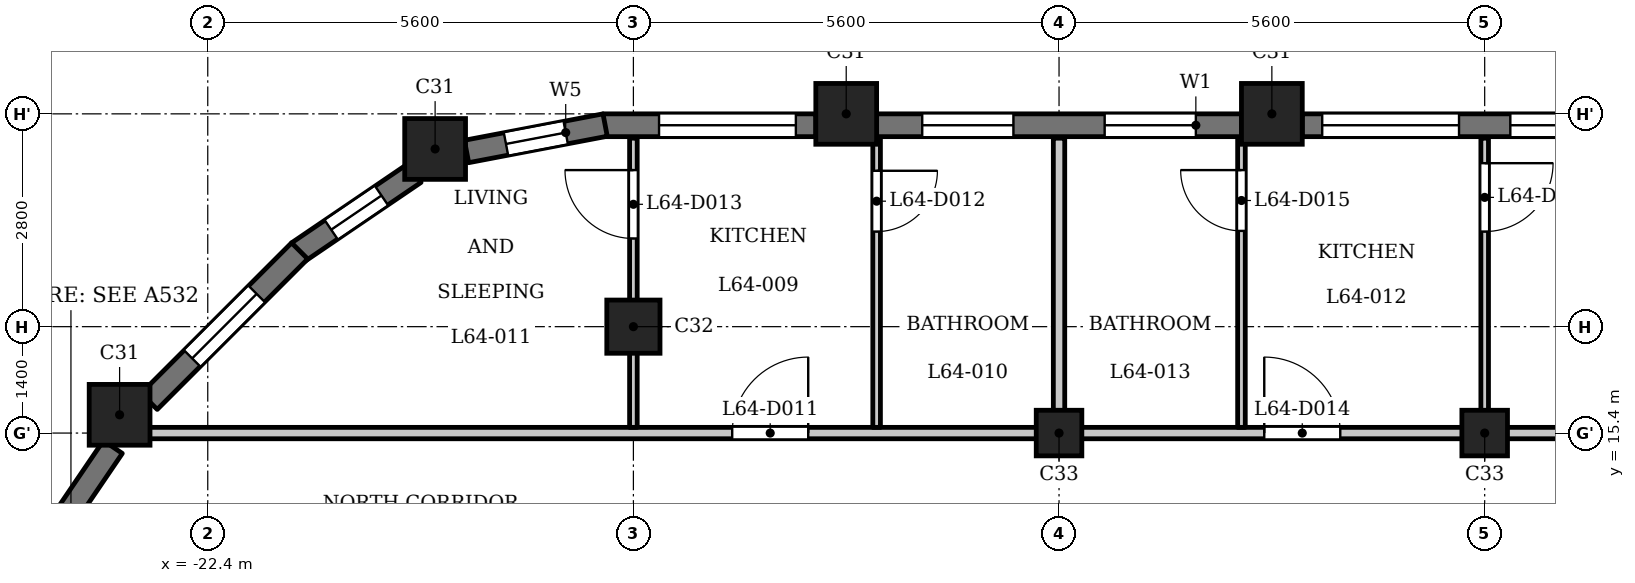
"""IFC4 building model, lengths in metres.
Left out: names, types, materials, properties, quantities, classifications, styles, units other than length and angle.
Written with IfcOpenShell. Run it as: python <this file> out.ifc"""

import sys

from ifc_helpers import new_model, si_unit, direction, frame, frame_2d, origin, origin_2d, place, context, subcontext, project, spatial, rectangle, extrude, element, fill, save


model = new_model("IFC4")
c1 = context("Model", 3, precision=1e-05, world=origin(), true_north=direction((0.0, 1.0)))
c2 = subcontext(c1, "Body", "Model", "MODEL_VIEW")
j1 = project(units=[si_unit("LENGTHUNIT", "METRE"), si_unit("PLANEANGLEUNIT", "RADIAN")], contexts=[c1])
p1 = place(None, origin())
s1 = spatial("IfcSite", under=j1, at=p1, CompositionType="ELEMENT")
p2 = place(p1, origin())
s2 = spatial("IfcBuilding", under=s1, at=p2, CompositionType="ELEMENT")
p3 = place(p2, frame((0.0, 0.0, 248.7)))
s3 = spatial("IfcBuildingStorey", under=s2, at=p3, CompositionType="ELEMENT", Elevation=248.7)
for number, where, z_axis, x_axis in (
    (1, (-8.4, 19.6, 0.0), (0.0, 0.0, 1.0), (1.0, 0.0, 0.0)),
    (2, (-14.0, 19.6, 0.0), (0.0, 0.0, 1.0), (1.0, 0.0, 0.0)),
    (3, (-19.409, 19.138, 0.0), (0.0, 0.0, 1.0), (1.0, 0.0, 0.0)),
    (4, (-23.56, 15.64, 0.0), (0.0, 0.0, 1.0), (1.0, 0.0, 0.0)),
):
    element("IfcColumn", number, at=place(p3, frame(where, z_axis=z_axis, x_axis=x_axis)), inside=s3, PredefinedType="COLUMN", context=c2, shape_type="SweptSolid", body=[
        extrude(rectangle(XDim=0.8, YDim=0.8, at=origin_2d()), origin(), (0.0, 0.0, 1.0), 3.5),
    ])
p4 = place(p3, frame((-16.8, 16.8, 0.0), z_axis=(0.0, 0.0, 1.0), x_axis=(1.0, 0.0, 0.0)))
e5 = element("IfcColumn", 5, at=p4, inside=s3, PredefinedType="COLUMN", context=c2, shape_type="SweptSolid", body=[
    extrude(rectangle(XDim=0.7, YDim=0.7, at=origin_2d()), origin(), (0.0, 0.0, 1.0), 3.5),
])
for number, where, z_axis, x_axis in (
    (6, (-11.2, 15.4, 0.0), (0.0, 0.0, 1.0), (1.0, 0.0, 0.0)),
    (7, (-5.6, 15.4, 0.0), (0.0, 0.0, 1.0), (1.0, 0.0, 0.0)),
):
    element("IfcColumn", number, at=place(p3, frame(where, z_axis=z_axis, x_axis=x_axis)), inside=s3, PredefinedType="COLUMN", context=c2, shape_type="SweptSolid", body=[
        extrude(rectangle(XDim=0.6, YDim=0.6, at=origin_2d()), origin(), (0.0, 0.0, 1.0), 3.5),
    ])
p5 = place(p3, frame((-3.2, 19.45, 0.0), z_axis=(0.0, 0.0, 1.0), x_axis=(-1.0, 0.0, 0.0)))
e8 = element("IfcWall", 8, at=p5, inside=s3, PredefinedType="SOLIDWALL", context=c2, shape_type="SweptSolid", body=[
    extrude(rectangle(XDim=4.8, YDim=0.3, at=frame_2d((2.4, 0.0))), origin(), (0.0, 0.0, 1.0), 2.55),
])
p6 = place(p5, frame((0.262, 0.0, 0.9)))
e9 = element("IfcOpeningElement", 9, at=p6, cuts=e8, PredefinedType="OPENING", context=c2, shape_type="SweptSolid", body=[
    extrude(rectangle(XDim=1.8, YDim=1.25, at=frame_2d((0.9, 0.625))), frame((0.0, 0.16, 0.0), z_axis=(0.0, -1.0, 0.0), x_axis=(1.0, 0.0, 0.0)), (0.0, 0.0, 1.0), 0.32),
])
p7 = place(p5, frame((2.738, 0.0, 0.9)))
e10 = element("IfcOpeningElement", 10, at=p7, cuts=e8, PredefinedType="OPENING", context=c2, shape_type="SweptSolid", body=[
    extrude(rectangle(XDim=1.8, YDim=1.25, at=frame_2d((0.9, 0.625))), frame((0.0, 0.16, 0.0), z_axis=(0.0, -1.0, 0.0), x_axis=(1.0, 0.0, 0.0)), (0.0, 0.0, 1.0), 0.32),
])
p8 = place(p3, frame((-8.8, 19.45, 0.0), z_axis=(0.0, 0.0, 1.0), x_axis=(-1.0, 0.0, 0.0)))
e11 = element("IfcWall", 11, at=p8, inside=s3, PredefinedType="SOLIDWALL", context=c2, shape_type="SweptSolid", body=[
    extrude(rectangle(XDim=4.8, YDim=0.3, at=frame_2d((2.4, 0.0))), origin(), (0.0, 0.0, 1.0), 2.55),
])
p9 = place(p8, frame((0.6, 0.0, 0.6)))
e12 = element("IfcOpeningElement", 12, at=p9, cuts=e11, PredefinedType="OPENING", context=c2, shape_type="SweptSolid", body=[
    extrude(rectangle(XDim=1.2, YDim=1.55, at=frame_2d((0.6, 0.775))), frame((0.0, 0.16, 0.0), z_axis=(0.0, -1.0, 0.0), x_axis=(1.0, 0.0, 0.0)), (0.0, 0.0, 1.0), 0.32),
])
p10 = place(p8, frame((3.0, 0.0, 0.6)))
e13 = element("IfcOpeningElement", 13, at=p10, cuts=e11, PredefinedType="OPENING", context=c2, shape_type="SweptSolid", body=[
    extrude(rectangle(XDim=1.2, YDim=1.55, at=frame_2d((0.6, 0.775))), frame((0.0, 0.16, 0.0), z_axis=(0.0, -1.0, 0.0), x_axis=(1.0, 0.0, 0.0)), (0.0, 0.0, 1.0), 0.32),
])
p11 = place(p3, frame((-14.4, 19.45, 0.0), z_axis=(0.0, 0.0, 1.0), x_axis=(-1.0, 0.0, 0.0)))
e14 = element("IfcWall", 14, at=p11, inside=s3, PredefinedType="SOLIDWALL", context=c2, shape_type="SweptSolid", body=[
    extrude(rectangle(XDim=2.8, YDim=0.3, at=frame_2d((1.4, 0.0))), origin(), (0.0, 0.0, 1.0), 2.55),
])
p12 = place(p11, frame((0.262, 0.0, 0.9)))
e15 = element("IfcOpeningElement", 15, at=p12, cuts=e14, PredefinedType="OPENING", context=c2, shape_type="SweptSolid", body=[
    extrude(rectangle(XDim=1.8, YDim=1.25, at=frame_2d((0.9, 0.625))), frame((0.0, 0.16, 0.0), z_axis=(0.0, -1.0, 0.0), x_axis=(1.0, 0.0, 0.0)), (0.0, 0.0, 1.0), 0.32),
])
p13 = place(p3, frame((-17.172, 19.453, 0.0), z_axis=(0.0, 0.0, 1.0), x_axis=(-0.982301706131, -0.187305520826, 0.0)))
e16 = element("IfcWall", 16, at=p13, inside=s3, PredefinedType="SOLIDWALL", context=c2, shape_type="SweptSolid", body=[
    extrude(rectangle(XDim=1.856, YDim=0.3, at=frame_2d((0.928, 0.0))), origin(), (0.0, 0.0, 1.0), 2.55),
])
p14 = place(p13, frame((0.528, 0.0, 0.6)))
e17 = element("IfcOpeningElement", 17, at=p14, cuts=e16, PredefinedType="OPENING", context=c2, shape_type="SweptSolid", body=[
    extrude(rectangle(XDim=0.8, YDim=1.55, at=frame_2d((0.4, 0.775))), frame((0.0, 0.16, 0.0), z_axis=(0.0, -1.0, 0.0), x_axis=(1.0, 0.0, 0.0)), (0.0, 0.0, 1.0), 0.32),
])
p15 = place(p3, frame((-19.678, 18.822, 0.0), z_axis=(0.0, 0.0, 1.0), x_axis=(-0.826997446962, -0.562205676526, 0.0)))
e18 = element("IfcWall", 18, at=p15, inside=s3, PredefinedType="SOLIDWALL", context=c2, shape_type="SweptSolid", body=[
    extrude(rectangle(XDim=1.856, YDim=0.3, at=frame_2d((0.928, 0.0))), origin(), (0.0, 0.0, 1.0), 2.55),
])
p16 = place(p15, frame((0.528, 0.0, 0.6)))
e19 = element("IfcOpeningElement", 19, at=p16, cuts=e18, PredefinedType="OPENING", context=c2, shape_type="SweptSolid", body=[
    extrude(rectangle(XDim=0.8, YDim=1.55, at=frame_2d((0.4, 0.775))), frame((0.0, 0.16, 0.0), z_axis=(0.0, -1.0, 0.0), x_axis=(1.0, 0.0, 0.0)), (0.0, 0.0, 1.0), 0.32),
])
p17 = place(p3, frame((-21.191, 17.797, 0.0), z_axis=(0.0, 0.0, 1.0), x_axis=(-0.707106781187, -0.707106781187, 0.0)))
e20 = element("IfcWall", 20, at=p17, inside=s3, PredefinedType="SOLIDWALL", context=c2, shape_type="SweptSolid", body=[
    extrude(rectangle(XDim=2.8, YDim=0.3, at=frame_2d((1.4, 0.0))), origin(), (0.0, 0.0, 1.0), 2.55),
])
p18 = place(p17, frame((0.8, 0.0, 0.6)))
e21 = element("IfcOpeningElement", 21, at=p18, cuts=e20, PredefinedType="OPENING", context=c2, shape_type="SweptSolid", body=[
    extrude(rectangle(XDim=1.2, YDim=1.55, at=frame_2d((0.6, 0.775))), frame((0.0, 0.16, 0.0), z_axis=(0.0, -1.0, 0.0), x_axis=(1.0, 0.0, 0.0)), (0.0, 0.0, 1.0), 0.32),
])
p19 = place(p3, frame((-23.648, 15.217, 0.0), z_axis=(0.0, 0.0, 1.0), x_axis=(-0.562043265151, -0.827107833416, 0.0)))
e22 = element("IfcWall", 22, at=p19, inside=s3, PredefinedType="SOLIDWALL", context=c2, shape_type="SweptSolid", body=[
    extrude(rectangle(XDim=1.377, YDim=0.3, at=frame_2d((0.688, 0.0))), origin(), (0.0, 0.0, 1.0), 2.55),
])
p20 = place(p3, frame((-23.55, 15.4, 0.0), z_axis=(0.0, 0.0, 1.0), x_axis=(1.0, 0.0, 0.0)))
e23 = element("IfcWall", 23, at=p20, inside=s3, PredefinedType="PARTITIONING", context=c2, shape_type="SweptSolid", body=[
    extrude(rectangle(XDim=46.872, YDim=0.15, at=frame_2d((23.436, 0.0))), origin(), (0.0, 0.0, 1.0), 3.2),
])
p21 = place(p20, frame((8.05, 0.0, 0.0)))
e24 = element("IfcOpeningElement", 24, at=p21, cuts=e23, PredefinedType="OPENING", context=c2, shape_type="SweptSolid", body=[
    extrude(rectangle(XDim=1.0, YDim=2.1, at=frame_2d((0.5, 1.05))), frame((0.0, 0.085, 0.0), z_axis=(0.0, -1.0, 0.0), x_axis=(1.0, 0.0, 0.0)), (0.0, 0.0, 1.0), 0.17),
])
p22 = place(p20, frame((15.05, 0.0, 0.0)))
e25 = element("IfcOpeningElement", 25, at=p22, cuts=e23, PredefinedType="OPENING", context=c2, shape_type="SweptSolid", body=[
    extrude(rectangle(XDim=1.0, YDim=2.1, at=frame_2d((0.5, 1.05))), frame((0.0, 0.085, 0.0), z_axis=(0.0, -1.0, 0.0), x_axis=(1.0, 0.0, 0.0)), (0.0, 0.0, 1.0), 0.17),
])
p23 = place(p20, frame((30.95, 0.0, 0.0)))
e26 = element("IfcOpeningElement", 26, at=p23, cuts=e23, PredefinedType="OPENING", context=c2, shape_type="SweptSolid", body=[
    extrude(rectangle(XDim=1.0, YDim=2.1, at=frame_2d((0.5, 1.05))), frame((0.0, 0.085, 0.0), z_axis=(0.0, -1.0, 0.0), x_axis=(1.0, 0.0, 0.0)), (0.0, 0.0, 1.0), 0.17),
])
p24 = place(p20, frame((38.2, 0.0, 0.0)))
e27 = element("IfcOpeningElement", 27, at=p24, cuts=e23, PredefinedType="OPENING", context=c2, shape_type="SweptSolid", body=[
    extrude(rectangle(XDim=1.0, YDim=2.1, at=frame_2d((0.5, 1.05))), frame((0.0, 0.085, 0.0), z_axis=(0.0, -1.0, 0.0), x_axis=(1.0, 0.0, 0.0)), (0.0, 0.0, 1.0), 0.17),
])
p25 = place(p3, frame((-16.8, 15.475, 0.0), z_axis=(0.0, 0.0, 1.0), x_axis=(0.0, 1.0, 0.0)))
e28 = element("IfcWall", 28, at=p25, inside=s3, PredefinedType="PARTITIONING", context=c2, shape_type="SweptSolid", body=[
    extrude(rectangle(XDim=3.805, YDim=0.1, at=frame_2d((1.902, 0.0))), origin(), (0.0, 0.0, 1.0), 3.2),
])
p26 = place(p25, frame((2.485, 0.0, 0.0)))
e29 = element("IfcOpeningElement", 29, at=p26, cuts=e28, PredefinedType="OPENING", context=c2, shape_type="SweptSolid", body=[
    extrude(rectangle(XDim=0.9, YDim=2.1, at=frame_2d((0.45, 1.05))), frame((0.0, 0.06, 0.0), z_axis=(0.0, -1.0, 0.0), x_axis=(1.0, 0.0, 0.0)), (0.0, 0.0, 1.0), 0.12),
])
p27 = place(p3, frame((-13.6, 15.475, 0.0), z_axis=(0.0, 0.0, 1.0), x_axis=(0.0, 1.0, 0.0)))
e30 = element("IfcWall", 30, at=p27, inside=s3, PredefinedType="PARTITIONING", context=c2, shape_type="SweptSolid", body=[
    extrude(rectangle(XDim=3.805, YDim=0.1, at=frame_2d((1.902, 0.0))), origin(), (0.0, 0.0, 1.0), 3.2),
])
p28 = place(p27, frame((2.576, 0.0, 0.0)))
e31 = element("IfcOpeningElement", 31, at=p28, cuts=e30, PredefinedType="OPENING", context=c2, shape_type="SweptSolid", body=[
    extrude(rectangle(XDim=0.8, YDim=2.1, at=frame_2d((0.4, 1.05))), frame((0.0, 0.06, 0.0), z_axis=(0.0, -1.0, 0.0), x_axis=(1.0, 0.0, 0.0)), (0.0, 0.0, 1.0), 0.12),
])
p29 = place(p3, frame((-11.2, 15.475, 0.0), z_axis=(0.0, 0.0, 1.0), x_axis=(0.0, 1.0, 0.0)))
e32 = element("IfcWall", 32, at=p29, inside=s3, PredefinedType="PARTITIONING", context=c2, shape_type="SweptSolid", body=[
    extrude(rectangle(XDim=3.805, YDim=0.15, at=frame_2d((1.902, 0.0))), origin(), (0.0, 0.0, 1.0), 3.2),
])
p30 = place(p3, frame((-8.8, 15.475, 0.0), z_axis=(0.0, 0.0, 1.0), x_axis=(0.0, 1.0, 0.0)))
e33 = element("IfcWall", 33, at=p30, inside=s3, PredefinedType="PARTITIONING", context=c2, shape_type="SweptSolid", body=[
    extrude(rectangle(XDim=3.805, YDim=0.1, at=frame_2d((1.902, 0.0))), origin(), (0.0, 0.0, 1.0), 3.2),
])
p31 = place(p30, frame((2.585, 0.0, 0.0)))
e34 = element("IfcOpeningElement", 34, at=p31, cuts=e33, PredefinedType="OPENING", context=c2, shape_type="SweptSolid", body=[
    extrude(rectangle(XDim=0.8, YDim=2.1, at=frame_2d((0.4, 1.05))), frame((0.0, 0.06, 0.0), z_axis=(0.0, -1.0, 0.0), x_axis=(1.0, 0.0, 0.0)), (0.0, 0.0, 1.0), 0.12),
])
p32 = place(p3, frame((-5.6, 15.475, 0.0), z_axis=(0.0, 0.0, 1.0), x_axis=(0.0, 1.0, 0.0)))
e35 = element("IfcWall", 35, at=p32, inside=s3, PredefinedType="PARTITIONING", context=c2, shape_type="SweptSolid", body=[
    extrude(rectangle(XDim=3.805, YDim=0.1, at=frame_2d((1.902, 0.0))), origin(), (0.0, 0.0, 1.0), 3.2),
])
p33 = place(p32, frame((2.576, 0.0, 0.0)))
e36 = element("IfcOpeningElement", 36, at=p33, cuts=e35, PredefinedType="OPENING", context=c2, shape_type="SweptSolid", body=[
    extrude(rectangle(XDim=0.9, YDim=2.1, at=frame_2d((0.45, 1.05))), frame((0.0, 0.06, 0.0), z_axis=(0.0, -1.0, 0.0), x_axis=(1.0, 0.0, 0.0)), (0.0, 0.0, 1.0), 0.12),
])
p34 = place(p21, origin())
e37 = element("IfcDoor", 37, at=p34, inside=s3, OperationType="SINGLE_SWING_LEFT", PredefinedType="DOOR", context=c2, shape_type="SweptSolid", body=[
    extrude(rectangle(XDim=1.0, YDim=2.1, at=frame_2d((0.5, 1.05))), frame((0.0, 0.025, 0.0), z_axis=(0.0, -1.0, 0.0), x_axis=(1.0, 0.0, 0.0)), (0.0, 0.0, 1.0), 0.05),
])
fill(e24, e37)
p35 = place(p28, origin())
e38 = element("IfcDoor", 38, at=p35, inside=s3, OperationType="SINGLE_SWING_RIGHT", PredefinedType="DOOR", context=c2, shape_type="SweptSolid", body=[
    extrude(rectangle(XDim=0.8, YDim=2.1, at=frame_2d((0.4, 1.05))), frame((0.0, 0.025, 0.0), z_axis=(0.0, -1.0, 0.0), x_axis=(1.0, 0.0, 0.0)), (0.0, 0.0, 1.0), 0.05),
])
fill(e31, e38)
p36 = place(p26, origin())
e39 = element("IfcDoor", 39, at=p36, inside=s3, OperationType="SINGLE_SWING_LEFT", PredefinedType="DOOR", context=c2, shape_type="SweptSolid", body=[
    extrude(rectangle(XDim=0.9, YDim=2.1, at=frame_2d((0.45, 1.05))), frame((0.0, 0.025, 0.0), z_axis=(0.0, -1.0, 0.0), x_axis=(1.0, 0.0, 0.0)), (0.0, 0.0, 1.0), 0.05),
])
fill(e29, e39)
p37 = place(p22, origin())
e40 = element("IfcDoor", 40, at=p37, inside=s3, OperationType="SINGLE_SWING_RIGHT", PredefinedType="DOOR", context=c2, shape_type="SweptSolid", body=[
    extrude(rectangle(XDim=1.0, YDim=2.1, at=frame_2d((0.5, 1.05))), frame((0.0, 0.025, 0.0), z_axis=(0.0, -1.0, 0.0), x_axis=(1.0, 0.0, 0.0)), (0.0, 0.0, 1.0), 0.05),
])
fill(e25, e40)
p38 = place(p31, origin())
e41 = element("IfcDoor", 41, at=p38, inside=s3, OperationType="SINGLE_SWING_LEFT", PredefinedType="DOOR", context=c2, shape_type="SweptSolid", body=[
    extrude(rectangle(XDim=0.8, YDim=2.1, at=frame_2d((0.4, 1.05))), frame((0.0, 0.025, 0.0), z_axis=(0.0, -1.0, 0.0), x_axis=(1.0, 0.0, 0.0)), (0.0, 0.0, 1.0), 0.05),
])
fill(e34, e41)
p39 = place(p33, origin())
e42 = element("IfcDoor", 42, at=p39, inside=s3, OperationType="SINGLE_SWING_RIGHT", PredefinedType="DOOR", context=c2, shape_type="SweptSolid", body=[
    extrude(rectangle(XDim=0.9, YDim=2.1, at=frame_2d((0.45, 1.05))), frame((0.0, 0.025, 0.0), z_axis=(0.0, -1.0, 0.0), x_axis=(1.0, 0.0, 0.0)), (0.0, 0.0, 1.0), 0.05),
])
fill(e36, e42)
p40 = place(p6, origin())
e43 = element("IfcWindow", 43, at=p40, inside=s3, PartitioningType="SINGLE_PANEL", PredefinedType="WINDOW", context=c2, shape_type="SweptSolid", body=[
    extrude(rectangle(XDim=1.8, YDim=1.25, at=frame_2d((0.9, 0.625))), frame((0.0, 0.03, 0.0), z_axis=(0.0, -1.0, 0.0), x_axis=(1.0, 0.0, 0.0)), (0.0, 0.0, 1.0), 0.06),
])
fill(e9, e43)
p41 = place(p7, origin())
e44 = element("IfcWindow", 44, at=p41, inside=s3, PartitioningType="SINGLE_PANEL", PredefinedType="WINDOW", context=c2, shape_type="SweptSolid", body=[
    extrude(rectangle(XDim=1.8, YDim=1.25, at=frame_2d((0.9, 0.625))), frame((0.0, 0.03, 0.0), z_axis=(0.0, -1.0, 0.0), x_axis=(1.0, 0.0, 0.0)), (0.0, 0.0, 1.0), 0.06),
])
fill(e10, e44)
p42 = place(p9, origin())
e45 = element("IfcWindow", 45, at=p42, inside=s3, PartitioningType="SINGLE_PANEL", PredefinedType="WINDOW", context=c2, shape_type="SweptSolid", body=[
    extrude(rectangle(XDim=1.2, YDim=1.55, at=frame_2d((0.6, 0.775))), frame((0.0, 0.03, 0.0), z_axis=(0.0, -1.0, 0.0), x_axis=(1.0, 0.0, 0.0)), (0.0, 0.0, 1.0), 0.06),
])
fill(e12, e45)
p43 = place(p10, origin())
e46 = element("IfcWindow", 46, at=p43, inside=s3, PartitioningType="SINGLE_PANEL", PredefinedType="WINDOW", context=c2, shape_type="SweptSolid", body=[
    extrude(rectangle(XDim=1.2, YDim=1.55, at=frame_2d((0.6, 0.775))), frame((0.0, 0.03, 0.0), z_axis=(0.0, -1.0, 0.0), x_axis=(1.0, 0.0, 0.0)), (0.0, 0.0, 1.0), 0.06),
])
fill(e13, e46)
p44 = place(p12, origin())
e47 = element("IfcWindow", 47, at=p44, inside=s3, PartitioningType="SINGLE_PANEL", PredefinedType="WINDOW", context=c2, shape_type="SweptSolid", body=[
    extrude(rectangle(XDim=1.8, YDim=1.25, at=frame_2d((0.9, 0.625))), frame((0.0, 0.03, 0.0), z_axis=(0.0, -1.0, 0.0), x_axis=(1.0, 0.0, 0.0)), (0.0, 0.0, 1.0), 0.06),
])
fill(e15, e47)
p45 = place(p14, origin())
e48 = element("IfcWindow", 48, at=p45, inside=s3, PartitioningType="SINGLE_PANEL", PredefinedType="WINDOW", context=c2, shape_type="SweptSolid", body=[
    extrude(rectangle(XDim=0.8, YDim=1.55, at=frame_2d((0.4, 0.775))), frame((0.0, 0.03, 0.0), z_axis=(0.0, -1.0, 0.0), x_axis=(1.0, 0.0, 0.0)), (0.0, 0.0, 1.0), 0.06),
])
fill(e17, e48)
p46 = place(p16, origin())
e49 = element("IfcWindow", 49, at=p46, inside=s3, PartitioningType="SINGLE_PANEL", PredefinedType="WINDOW", context=c2, shape_type="SweptSolid", body=[
    extrude(rectangle(XDim=0.8, YDim=1.55, at=frame_2d((0.4, 0.775))), frame((0.0, 0.03, 0.0), z_axis=(0.0, -1.0, 0.0), x_axis=(1.0, 0.0, 0.0)), (0.0, 0.0, 1.0), 0.06),
])
fill(e19, e49)
p47 = place(p18, origin())
e50 = element("IfcWindow", 50, at=p47, inside=s3, PartitioningType="SINGLE_PANEL", PredefinedType="WINDOW", context=c2, shape_type="SweptSolid", body=[
    extrude(rectangle(XDim=1.2, YDim=1.55, at=frame_2d((0.6, 0.775))), frame((0.0, 0.03, 0.0), z_axis=(0.0, -1.0, 0.0), x_axis=(1.0, 0.0, 0.0)), (0.0, 0.0, 1.0), 0.06),
])
fill(e21, e50)
save(model, sys.argv[1])
